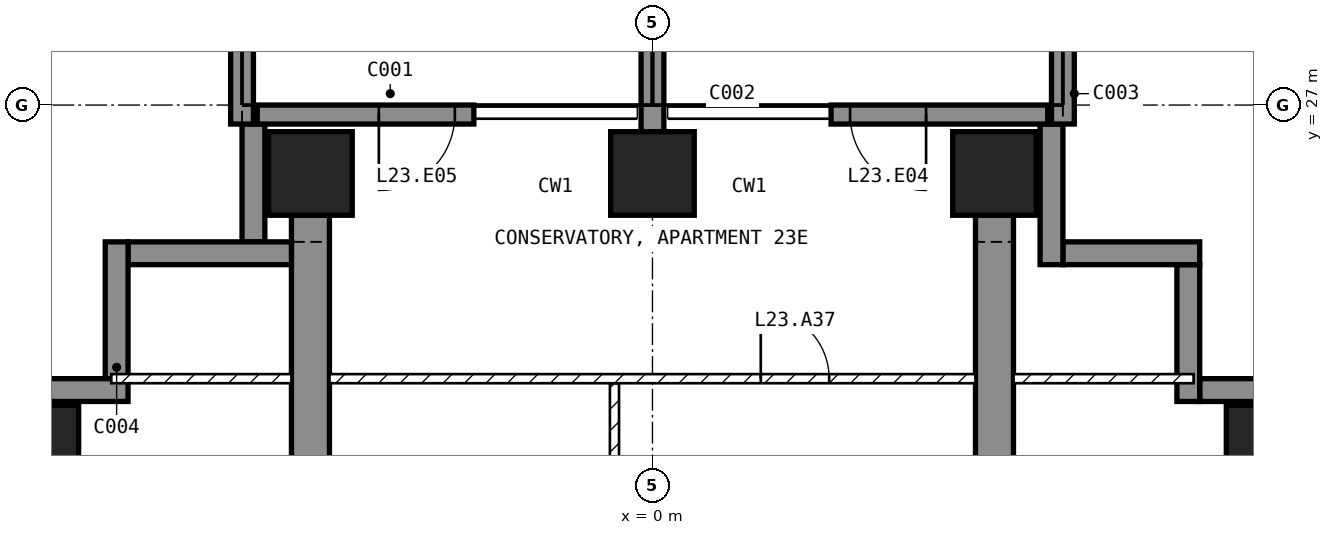
"""IFC4 building model, lengths in metres.
Left out: names, types, materials, properties, quantities, classifications, styles, units other than length and angle.
Written with IfcOpenShell. Run it as: python <this file> out.ifc"""

import sys

from ifc_helpers import new_model, si_unit, direction, frame, frame_2d, origin, origin_2d, place, context, subcontext, project, spatial, polyline, rectangle, outline, extrude, element, fill, save


model = new_model("IFC4")
c1 = context("Model", 3, precision=1e-05, world=origin(), true_north=direction((0.0, 1.0)))
c2 = subcontext(c1, "Body", "Model", "MODEL_VIEW")
j1 = project(units=[si_unit("LENGTHUNIT", "METRE"), si_unit("PLANEANGLEUNIT", "RADIAN")], contexts=[c1])
p1 = place(None, origin())
s1 = spatial("IfcSite", under=j1, at=p1, CompositionType="ELEMENT")
p2 = place(p1, origin())
s2 = spatial("IfcBuilding", under=s1, at=p2, CompositionType="ELEMENT")
p3 = place(p2, frame((0.0, 0.0, 102.4)))
s3 = spatial("IfcBuildingStorey", under=s2, at=p3, CompositionType="ELEMENT", Elevation=102.4)
for number, where, z_axis, x_axis in (
    (1, (-8.1, 22.5, -0.25), (0.0, 0.0, 1.0), (1.0, 0.0, 0.0)),
    (2, (-4.5, 26.1, -0.25), (0.0, 0.0, 1.0), (1.0, 0.0, 0.0)),
    (3, (0.0, 26.1, -0.25), (0.0, 0.0, 1.0), (1.0, 0.0, 0.0)),
    (4, (4.5, 26.1, -0.25), (0.0, 0.0, 1.0), (1.0, 0.0, 0.0)),
    (5, (8.1, 22.5, -0.25), (0.0, 0.0, 1.0), (1.0, 0.0, 0.0)),
):
    element("IfcColumn", number, at=place(p3, frame(where, z_axis=z_axis, x_axis=x_axis)), inside=s3, PredefinedType="COLUMN", context=c2, shape_type="SweptSolid", body=[
        extrude(rectangle(XDim=1.1, YDim=1.1, at=origin_2d()), origin(), (0.0, 0.0, 1.0), 3.5),
    ])
for number, where, z_axis, x_axis in (
    (6, (-4.75, 9.0, -0.25), (1.0, 0.0, 0.0), (0.0, 1.0, 0.0)),
    (7, (4.25, 9.0, -0.25), (1.0, 0.0, 0.0), (0.0, 1.0, 0.0)),
):
    element("IfcWall", number, at=place(p3, frame(where, z_axis=z_axis, x_axis=x_axis)), inside=s3, PredefinedType="SHEAR", context=c2, shape_type="SweptSolid", body=[
        extrude(outline(polyline([(0.0, 0.0), (2.1, 0.0), (2.1, 2.65), (4.5, 2.65), (4.5, 0.0), (9.9, 0.0), (9.9, 2.65), (12.3, 2.65), (12.3, 0.0), (16.55, 0.0), (16.55, 3.5), (0.0, 3.5), (0.0, 0.0)])), origin(), (0.0, 0.0, 1.0), 0.5),
    ])
p4 = place(p3, frame((5.2, 26.875, 0.0), z_axis=(0.0, 0.0, 1.0), x_axis=(-1.0, 0.0, 0.0)))
e8 = element("IfcWall", 8, at=p4, inside=s3, PredefinedType="SOLIDWALL", context=c2, shape_type="SweptSolid", body=[
    extrude(rectangle(XDim=2.85, YDim=0.25, at=frame_2d((1.425, 0.0))), origin(), (0.0, 0.0, 1.0), 3.25),
])
p5 = place(p4, frame((1.6, 0.0, 0.0)))
e9 = element("IfcOpeningElement", 9, at=p5, cuts=e8, PredefinedType="OPENING", context=c2, shape_type="SweptSolid", body=[
    extrude(rectangle(XDim=1.0, YDim=2.4, at=frame_2d((0.5, 1.2))), frame((0.0, 0.135, 0.0), z_axis=(0.0, -1.0, 0.0), x_axis=(1.0, 0.0, 0.0)), (0.0, 0.0, 1.0), 0.27),
])
p6 = place(p3, frame((-2.35, 26.875, 0.0), z_axis=(0.0, 0.0, 1.0), x_axis=(-1.0, 0.0, 0.0)))
e10 = element("IfcWall", 10, at=p6, inside=s3, PredefinedType="SOLIDWALL", context=c2, shape_type="SweptSolid", body=[
    extrude(rectangle(XDim=2.85, YDim=0.25, at=frame_2d((1.425, 0.0))), origin(), (0.0, 0.0, 1.0), 3.25),
])
p7 = place(p6, frame((0.25, 0.0, 0.0)))
e11 = element("IfcOpeningElement", 11, at=p7, cuts=e10, PredefinedType="OPENING", context=c2, shape_type="SweptSolid", body=[
    extrude(rectangle(XDim=1.0, YDim=2.4, at=frame_2d((0.5, 1.2))), frame((0.0, 0.135, 0.0), z_axis=(0.0, -1.0, 0.0), x_axis=(1.0, 0.0, 0.0)), (0.0, 0.0, 1.0), 0.27),
])
p8 = place(p3, frame((8.75, 23.25, 0.0), z_axis=(0.0, 0.0, 1.0), x_axis=(-1.0, 0.0, 0.0)))
e12 = element("IfcWall", 12, at=p8, inside=s3, PredefinedType="SOLIDWALL", context=c2, shape_type="SweptSolid", body=[
    extrude(rectangle(XDim=1.55, YDim=0.3, at=frame_2d((0.775, 0.0))), origin(), (0.0, 0.0, 1.0), 3.25),
])
p9 = place(p3, frame((7.05, 23.1, 0.0), z_axis=(0.0, 0.0, 1.0), x_axis=(0.0, 1.0, 0.0)))
e13 = element("IfcWall", 13, at=p9, inside=s3, PredefinedType="SOLIDWALL", context=c2, shape_type="SweptSolid", body=[
    extrude(rectangle(XDim=1.8, YDim=0.3, at=frame_2d((0.9, 0.0))), origin(), (0.0, 0.0, 1.0), 3.25),
])
p10 = place(p3, frame((7.2, 25.05, 0.0), z_axis=(0.0, 0.0, 1.0), x_axis=(-1.0, 0.0, 0.0)))
e14 = element("IfcWall", 14, at=p10, inside=s3, PredefinedType="SOLIDWALL", context=c2, shape_type="SweptSolid", body=[
    extrude(rectangle(XDim=1.8, YDim=0.3, at=frame_2d((0.9, 0.0))), origin(), (0.0, 0.0, 1.0), 3.25),
])
p11 = place(p3, frame((5.25, 24.9, 0.0), z_axis=(0.0, 0.0, 1.0), x_axis=(0.0, 1.0, 0.0)))
e15 = element("IfcWall", 15, at=p11, inside=s3, PredefinedType="SOLIDWALL", context=c2, shape_type="SweptSolid", body=[
    extrude(rectangle(XDim=1.85, YDim=0.3, at=frame_2d((0.925, 0.0))), origin(), (0.0, 0.0, 1.0), 3.25),
])
p12 = place(p3, frame((-5.25, 26.75, 0.0), z_axis=(0.0, 0.0, 1.0), x_axis=(0.0, -1.0, 0.0)))
e16 = element("IfcWall", 16, at=p12, inside=s3, PredefinedType="SOLIDWALL", context=c2, shape_type="SweptSolid", body=[
    extrude(rectangle(XDim=1.55, YDim=0.3, at=frame_2d((0.775, 0.0))), origin(), (0.0, 0.0, 1.0), 3.25),
])
p13 = place(p3, frame((-4.75, 25.05, 0.0), z_axis=(0.0, 0.0, 1.0), x_axis=(-1.0, 0.0, 0.0)))
e17 = element("IfcWall", 17, at=p13, inside=s3, PredefinedType="SOLIDWALL", context=c2, shape_type="SweptSolid", body=[
    extrude(rectangle(XDim=2.15, YDim=0.3, at=frame_2d((1.075, 0.0))), origin(), (0.0, 0.0, 1.0), 3.25),
])
p14 = place(p3, frame((-7.05, 25.2, 0.0), z_axis=(0.0, 0.0, 1.0), x_axis=(0.0, -1.0, 0.0)))
e18 = element("IfcWall", 18, at=p14, inside=s3, PredefinedType="SOLIDWALL", context=c2, shape_type="SweptSolid", body=[
    extrude(rectangle(XDim=1.8, YDim=0.3, at=frame_2d((0.9, 0.0))), origin(), (0.0, 0.0, 1.0), 3.25),
])
p15 = place(p3, frame((-6.9, 23.25, 0.0), z_axis=(0.0, 0.0, 1.0), x_axis=(-1.0, 0.0, 0.0)))
e19 = element("IfcWall", 19, at=p15, inside=s3, PredefinedType="SOLIDWALL", context=c2, shape_type="SweptSolid", body=[
    extrude(rectangle(XDim=1.85, YDim=0.3, at=frame_2d((0.925, 0.0))), origin(), (0.0, 0.0, 1.0), 3.25),
])
p16 = place(p3, frame((-5.4, 26.75, 0.0), z_axis=(0.0, 0.0, 1.0), x_axis=(0.0, 1.0, 0.0)))
e20 = element("IfcWall", 20, at=p16, inside=s3, PredefinedType="SOLIDWALL", context=c2, shape_type="SweptSolid", body=[
    extrude(rectangle(XDim=2.95, YDim=0.3, at=frame_2d((1.475, 0.0))), origin(), (0.0, 0.0, 1.0), 3.25),
])
p17 = place(p3, frame((0.0, 26.65, 0.0), z_axis=(0.0, 0.0, 1.0), x_axis=(0.0, 1.0, 0.0)))
e21 = element("IfcWall", 21, at=p17, inside=s3, PredefinedType="SOLIDWALL", context=c2, shape_type="SweptSolid", body=[
    extrude(rectangle(XDim=3.05, YDim=0.3, at=frame_2d((1.525, 0.0))), origin(), (0.0, 0.0, 1.0), 3.25),
])
p18 = place(p3, frame((5.4, 26.75, 0.0), z_axis=(0.0, 0.0, 1.0), x_axis=(0.0, 1.0, 0.0)))
e22 = element("IfcWall", 22, at=p18, inside=s3, PredefinedType="SOLIDWALL", context=c2, shape_type="SweptSolid", body=[
    extrude(rectangle(XDim=2.95, YDim=0.3, at=frame_2d((1.475, 0.0))), origin(), (0.0, 0.0, 1.0), 3.25),
])
p19 = place(p3, frame((-0.5, 18.96, 0.0), z_axis=(0.0, 0.0, 1.0), x_axis=(0.0, 1.0, 0.0)))
e23 = element("IfcWall", 23, at=p19, inside=s3, PredefinedType="PARTITIONING", context=c2, shape_type="SweptSolid", body=[
    extrude(rectangle(XDim=4.38, YDim=0.12, at=frame_2d((2.19, 0.0))), origin(), (0.0, 0.0, 1.0), 3.25),
])
p20 = place(p19, frame((1.74, 0.0, 0.0)))
e24 = element("IfcOpeningElement", 24, at=p20, cuts=e23, PredefinedType="OPENING", context=c2, shape_type="SweptSolid", body=[
    extrude(rectangle(XDim=0.9, YDim=2.1, at=frame_2d((0.45, 1.05))), frame((0.0, 0.07, 0.0), z_axis=(0.0, -1.0, 0.0), x_axis=(1.0, 0.0, 0.0)), (0.0, 0.0, 1.0), 0.14),
])
p21 = place(p3, frame((-4.25, 23.4, 0.0), z_axis=(0.0, 0.0, 1.0), x_axis=(1.0, 0.0, 0.0)))
e25 = element("IfcWall", 25, at=p21, inside=s3, PredefinedType="PARTITIONING", context=c2, shape_type="SweptSolid", body=[
    extrude(rectangle(XDim=8.5, YDim=0.12, at=frame_2d((4.25, 0.0))), origin(), (0.0, 0.0, 1.0), 3.25),
])
p22 = place(p21, frame((5.675, 0.0, 0.0)))
e26 = element("IfcOpeningElement", 26, at=p22, cuts=e25, PredefinedType="OPENING", context=c2, shape_type="SweptSolid", body=[
    extrude(rectangle(XDim=0.9, YDim=2.1, at=frame_2d((0.45, 1.05))), frame((0.0, 0.07, 0.0), z_axis=(0.0, -1.0, 0.0), x_axis=(1.0, 0.0, 0.0)), (0.0, 0.0, 1.0), 0.14),
])
for number, where, z_axis, x_axis in (
    (27, (4.75, 23.4, 0.0), (0.0, 0.0, 1.0), (1.0, 0.0, 0.0)),
    (28, (-7.12, 23.4, 0.0), (0.0, 0.0, 1.0), (1.0, 0.0, 0.0)),
):
    element("IfcWall", number, at=place(p3, frame(where, z_axis=z_axis, x_axis=x_axis)), inside=s3, PredefinedType="PARTITIONING", context=c2, shape_type="SweptSolid", body=[
        extrude(rectangle(XDim=2.37, YDim=0.12, at=frame_2d((1.185, 0.0))), origin(), (0.0, 0.0, 1.0), 3.25),
    ])
p23 = place(p5, origin())
e29 = element("IfcDoor", 29, at=p23, inside=s3, OperationType="SINGLE_SWING_LEFT", PredefinedType="DOOR", context=c2, shape_type="SweptSolid", body=[
    extrude(rectangle(XDim=1.0, YDim=2.4, at=frame_2d((0.5, 1.2))), frame((0.0, 0.025, 0.0), z_axis=(0.0, -1.0, 0.0), x_axis=(1.0, 0.0, 0.0)), (0.0, 0.0, 1.0), 0.05),
])
fill(e9, e29)
p24 = place(p7, origin())
e30 = element("IfcDoor", 30, at=p24, inside=s3, OperationType="SINGLE_SWING_RIGHT", PredefinedType="DOOR", context=c2, shape_type="SweptSolid", body=[
    extrude(rectangle(XDim=1.0, YDim=2.4, at=frame_2d((0.5, 1.2))), frame((0.0, 0.025, 0.0), z_axis=(0.0, -1.0, 0.0), x_axis=(1.0, 0.0, 0.0)), (0.0, 0.0, 1.0), 0.05),
])
fill(e11, e30)
p25 = place(p22, origin())
e31 = element("IfcDoor", 31, at=p25, inside=s3, OperationType="SINGLE_SWING_LEFT", PredefinedType="DOOR", context=c2, shape_type="SweptSolid", body=[
    extrude(rectangle(XDim=0.9, YDim=2.1, at=frame_2d((0.45, 1.05))), frame((0.0, 0.025, 0.0), z_axis=(0.0, -1.0, 0.0), x_axis=(1.0, 0.0, 0.0)), (0.0, 0.0, 1.0), 0.05),
])
fill(e26, e31)
save(model, sys.argv[1])
